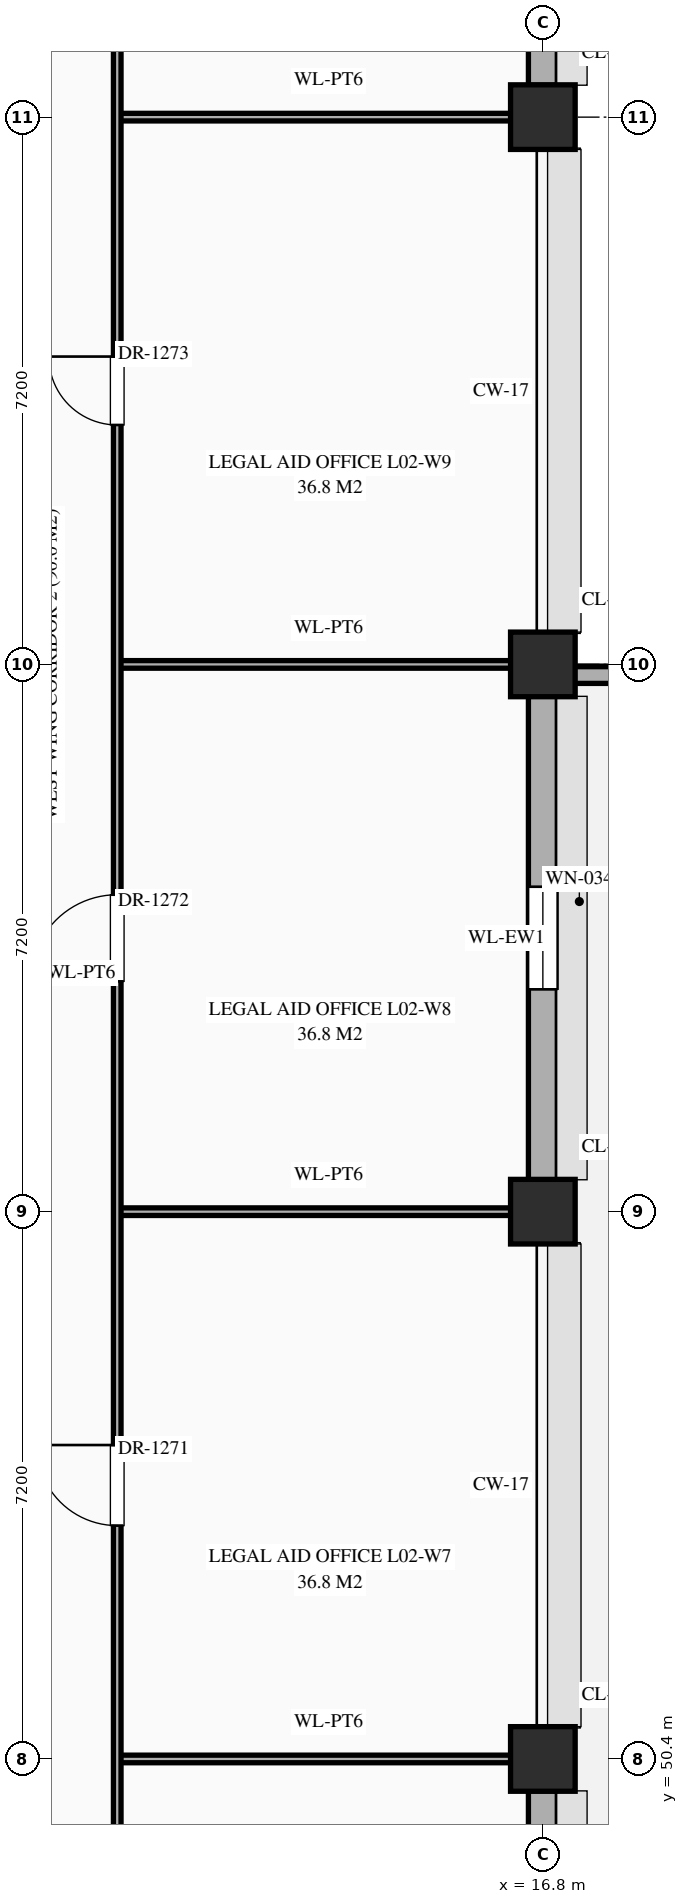
"""IFC4 building model, lengths in metres.
Left out: names, types, materials, properties, quantities, classifications, styles, units other than length and angle.
Written with IfcOpenShell. Run it as: python <this file> out.ifc"""

import sys

from ifc_helpers import new_model, si_unit, direction, frame, frame_2d, origin, origin_2d, place, context, subcontext, project, spatial, rectangle, extrude, element, fill, save


model = new_model("IFC4")
c1 = context("Model", 3, precision=1e-05, world=origin(), true_north=direction((0.0, 1.0)))
c2 = subcontext(c1, "Body", "Model", "MODEL_VIEW")
j1 = project(units=[si_unit("LENGTHUNIT", "METRE"), si_unit("PLANEANGLEUNIT", "RADIAN")], contexts=[c1])
p1 = place(None, origin())
s1 = spatial("IfcSite", under=j1, at=p1, CompositionType="ELEMENT")
p2 = place(p1, origin())
s2 = spatial("IfcBuilding", under=s1, at=p2, CompositionType="ELEMENT")
p3 = place(p2, frame((0.0, 0.0, 5.4)))
s3 = spatial("IfcBuildingStorey", under=s2, at=p3, CompositionType="ELEMENT", Elevation=5.4)
for number, where, z_axis, x_axis in (
    (1, (16.8, 50.4, 0.0), (0.0, 0.0, 1.0), (1.0, 0.0, 0.0)),
    (2, (16.8, 57.6, 0.0), (0.0, 0.0, 1.0), (1.0, 0.0, 0.0)),
    (3, (16.8, 64.8, 0.0), (0.0, 0.0, 1.0), (1.0, 0.0, 0.0)),
    (4, (16.8, 72.0, 0.0), (0.0, 0.0, 1.0), (1.0, 0.0, 0.0)),
):
    element("IfcColumn", number, at=place(p3, frame(where, z_axis=z_axis, x_axis=x_axis)), inside=s3, PredefinedType="COLUMN", context=c2, shape_type="SweptSolid", body=[
        extrude(rectangle(XDim=0.85, YDim=0.85, at=origin_2d()), origin(), (0.0, 0.0, 1.0), 5.4),
    ])
p4 = place(p3, frame((16.8, 43.62, 0.0), z_axis=(0.0, 0.0, 1.0), x_axis=(0.0, 1.0, 0.0)))
e5 = element("IfcWall", 5, at=p4, inside=s3, PredefinedType="STANDARD", context=c2, shape_type="SweptSolid", body=[
    extrude(rectangle(XDim=6.36, YDim=0.38, at=frame_2d((3.18, 0.0))), origin(), (0.0, 0.0, 1.0), 4.47),
])
p5 = place(p4, frame((2.505, 0.0, 0.85)))
e6 = element("IfcOpeningElement", 6, at=p5, cuts=e5, PredefinedType="OPENING", context=c2, shape_type="SweptSolid", body=[
    extrude(rectangle(XDim=1.35, YDim=1.2, at=frame_2d((0.675, 0.6))), frame((0.0, 0.202, 0.0), z_axis=(0.0, -1.0, 0.0), x_axis=(1.0, 0.0, 0.0)), (0.0, 0.0, 1.0), 0.404),
])
p6 = place(p3, frame((16.8, 58.02, 0.0), z_axis=(0.0, 0.0, 1.0), x_axis=(0.0, 1.0, 0.0)))
e7 = element("IfcWall", 7, at=p6, inside=s3, PredefinedType="STANDARD", context=c2, shape_type="SweptSolid", body=[
    extrude(rectangle(XDim=6.36, YDim=0.38, at=frame_2d((3.18, 0.0))), origin(), (0.0, 0.0, 1.0), 4.47),
])
p7 = place(p6, frame((2.505, 0.0, 0.85)))
e8 = element("IfcOpeningElement", 8, at=p7, cuts=e7, PredefinedType="OPENING", context=c2, shape_type="SweptSolid", body=[
    extrude(rectangle(XDim=1.35, YDim=1.56, at=frame_2d((0.675, 0.78))), frame((0.0, 0.202, 0.0), z_axis=(0.0, -1.0, 0.0), x_axis=(1.0, 0.0, 0.0)), (0.0, 0.0, 1.0), 0.404),
])
p8 = place(p3, frame((16.8, 72.42, 0.0), z_axis=(0.0, 0.0, 1.0), x_axis=(0.0, 1.0, 0.0)))
e9 = element("IfcWall", 9, at=p8, inside=s3, PredefinedType="STANDARD", context=c2, shape_type="SweptSolid", body=[
    extrude(rectangle(XDim=6.36, YDim=0.38, at=frame_2d((3.18, 0.0))), origin(), (0.0, 0.0, 1.0), 4.47),
])
p9 = place(p8, frame((2.505, 0.0, 0.85)))
e10 = element("IfcOpeningElement", 10, at=p9, cuts=e9, PredefinedType="OPENING", context=c2, shape_type="SweptSolid", body=[
    extrude(rectangle(XDim=1.35, YDim=1.92, at=frame_2d((0.675, 0.96))), frame((0.0, 0.202, 0.0), z_axis=(0.0, -1.0, 0.0), x_axis=(1.0, 0.0, 0.0)), (0.0, 0.0, 1.0), 0.404),
])
p10 = place(p3, frame((21.16, 64.66, 4.8), z_axis=(0.0, 0.0, 1.0), x_axis=(-1.0, 0.0, 0.0)))
e11 = element("IfcWall", 11, at=p10, inside=s3, PredefinedType="PARAPET", context=c2, shape_type="SweptSolid", body=[
    extrude(rectangle(XDim=4.06, YDim=0.22, at=frame_2d((2.03, 0.0))), origin(), (0.0, 0.0, 1.0), 1.2),
])
for number, where, z_axis, x_axis in (
    (12, (11.2, 50.4, 0.0), (0.0, 0.0, 1.0), (1.0, 0.0, 0.0)),
    (13, (11.2, 57.6, 0.0), (0.0, 0.0, 1.0), (1.0, 0.0, 0.0)),
    (14, (11.2, 64.8, 0.0), (0.0, 0.0, 1.0), (1.0, 0.0, 0.0)),
    (15, (11.2, 72.0, 0.0), (0.0, 0.0, 1.0), (1.0, 0.0, 0.0)),
):
    element("IfcWall", number, at=place(p3, frame(where, z_axis=z_axis, x_axis=x_axis)), inside=s3, PredefinedType="STANDARD", context=c2, shape_type="SweptSolid", body=[
        extrude(rectangle(XDim=5.56, YDim=0.1, at=frame_2d((2.78, 0.0))), origin(), (0.0, 0.0, 1.0), 4.27),
    ])
p11 = place(p3, frame((11.2, 43.2, 0.0), z_axis=(0.0, 0.0, 1.0), x_axis=(0.0, 1.0, 0.0)))
e16 = element("IfcWall", 16, at=p11, inside=s3, PredefinedType="STANDARD", context=c2, shape_type="SweptSolid", body=[
    extrude(rectangle(XDim=40.8, YDim=0.1, at=frame_2d((20.4, 0.0))), origin(), (0.0, 0.0, 1.0), 5.12),
])
p12 = place(p11, frame((37.87, 0.0, 0.0)))
e17 = element("IfcOpeningElement", 17, at=p12, cuts=e16, PredefinedType="OPENING", context=c2, shape_type="SweptSolid", body=[
    extrude(rectangle(XDim=1.06, YDim=2.4, at=frame_2d((0.53, 1.2))), frame((0.0, 0.062, 0.0), z_axis=(0.0, -1.0, 0.0), x_axis=(1.0, 0.0, 0.0)), (0.0, 0.0, 1.0), 0.124),
])
p13 = place(p11, frame((3.09, 0.0, 0.0)))
e18 = element("IfcOpeningElement", 18, at=p13, cuts=e16, PredefinedType="OPENING", context=c2, shape_type="SweptSolid", body=[
    extrude(rectangle(XDim=1.02, YDim=2.4, at=frame_2d((0.51, 1.2))), frame((0.0, 0.062, 0.0), z_axis=(0.0, -1.0, 0.0), x_axis=(1.0, 0.0, 0.0)), (0.0, 0.0, 1.0), 0.124),
])
p14 = place(p11, frame((10.27, 0.0, 0.0)))
e19 = element("IfcOpeningElement", 19, at=p14, cuts=e16, PredefinedType="OPENING", context=c2, shape_type="SweptSolid", body=[
    extrude(rectangle(XDim=1.06, YDim=2.4, at=frame_2d((0.53, 1.2))), frame((0.0, 0.062, 0.0), z_axis=(0.0, -1.0, 0.0), x_axis=(1.0, 0.0, 0.0)), (0.0, 0.0, 1.0), 0.124),
])
p15 = place(p11, frame((17.43, 0.0, 0.0)))
e20 = element("IfcOpeningElement", 20, at=p15, cuts=e16, PredefinedType="OPENING", context=c2, shape_type="SweptSolid", body=[
    extrude(rectangle(XDim=1.14, YDim=2.4, at=frame_2d((0.57, 1.2))), frame((0.0, 0.062, 0.0), z_axis=(0.0, -1.0, 0.0), x_axis=(1.0, 0.0, 0.0)), (0.0, 0.0, 1.0), 0.124),
])
p16 = place(p11, frame((24.75, 0.0, 0.0)))
e21 = element("IfcOpeningElement", 21, at=p16, cuts=e16, PredefinedType="OPENING", context=c2, shape_type="SweptSolid", body=[
    extrude(rectangle(XDim=0.9, YDim=2.15, at=frame_2d((0.45, 1.075))), frame((0.0, 0.062, 0.0), z_axis=(0.0, -1.0, 0.0), x_axis=(1.0, 0.0, 0.0)), (0.0, 0.0, 1.0), 0.124),
])
p17 = place(p11, frame((31.97, 0.0, 0.0)))
e22 = element("IfcOpeningElement", 22, at=p17, cuts=e16, PredefinedType="OPENING", context=c2, shape_type="SweptSolid", body=[
    extrude(rectangle(XDim=0.86, YDim=2.1, at=frame_2d((0.43, 1.05))), frame((0.0, 0.062, 0.0), z_axis=(0.0, -1.0, 0.0), x_axis=(1.0, 0.0, 0.0)), (0.0, 0.0, 1.0), 0.124),
])
p18 = place(p7, origin())
e23 = element("IfcWindow", 23, at=p18, inside=s3, PartitioningType="SINGLE_PANEL", PredefinedType="WINDOW", context=c2, shape_type="SweptSolid", body=[
    extrude(rectangle(XDim=1.35, YDim=1.56, at=frame_2d((0.675, 0.78))), frame((0.0, 0.03, 0.0), z_axis=(0.0, -1.0, 0.0), x_axis=(1.0, 0.0, 0.0)), (0.0, 0.0, 1.0), 0.06),
])
fill(e8, e23)
p19 = place(p14, origin())
e24 = element("IfcDoor", 24, at=p19, inside=s3, OperationType="SINGLE_SWING_RIGHT", PredefinedType="DOOR", context=c2, shape_type="SweptSolid", body=[
    extrude(rectangle(XDim=1.06, YDim=2.4, at=frame_2d((0.53, 1.2))), frame((0.0, 0.025, 0.0), z_axis=(0.0, -1.0, 0.0), x_axis=(1.0, 0.0, 0.0)), (0.0, 0.0, 1.0), 0.05),
])
fill(e19, e24)
p20 = place(p15, origin())
e25 = element("IfcDoor", 25, at=p20, inside=s3, OperationType="SINGLE_SWING_LEFT", PredefinedType="DOOR", context=c2, shape_type="SweptSolid", body=[
    extrude(rectangle(XDim=1.14, YDim=2.4, at=frame_2d((0.57, 1.2))), frame((0.0, 0.025, 0.0), z_axis=(0.0, -1.0, 0.0), x_axis=(1.0, 0.0, 0.0)), (0.0, 0.0, 1.0), 0.05),
])
fill(e20, e25)
p21 = place(p16, origin())
e26 = element("IfcDoor", 26, at=p21, inside=s3, OperationType="SINGLE_SWING_RIGHT", PredefinedType="DOOR", context=c2, shape_type="SweptSolid", body=[
    extrude(rectangle(XDim=0.9, YDim=2.15, at=frame_2d((0.45, 1.075))), frame((0.0, 0.025, 0.0), z_axis=(0.0, -1.0, 0.0), x_axis=(1.0, 0.0, 0.0)), (0.0, 0.0, 1.0), 0.05),
])
fill(e21, e26)
save(model, sys.argv[1])
